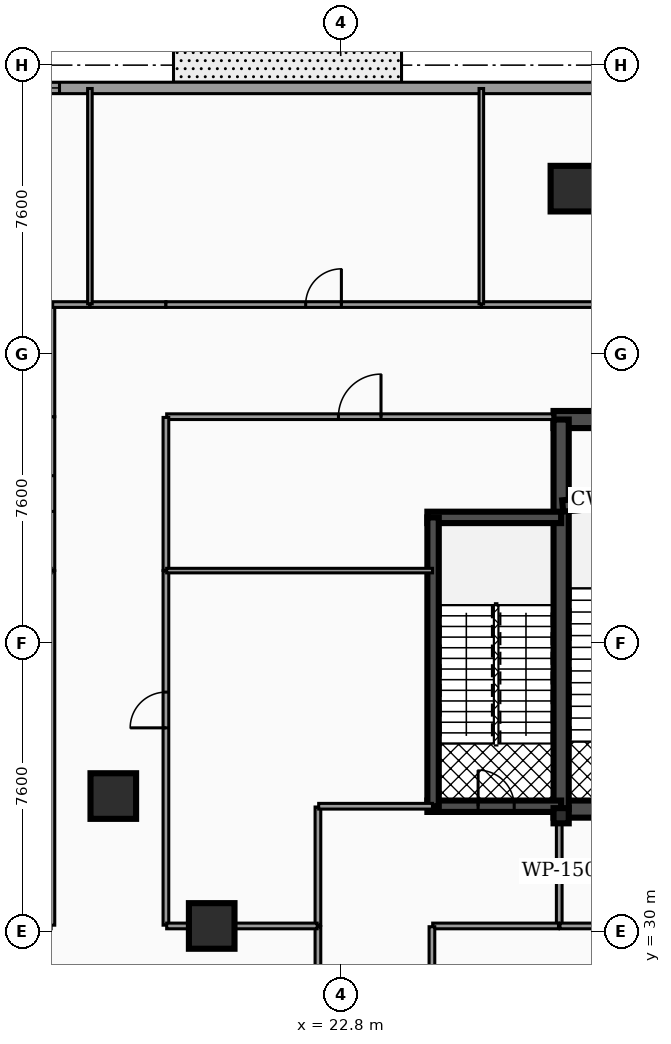
"""IFC4 building model, lengths in metres.
Left out: names, types, materials, properties, quantities, classifications, styles, units other than length and angle.
Written with IfcOpenShell. Run it as: python <this file> out.ifc"""

import sys

from ifc_helpers import new_model, si_unit, direction, frame, frame_2d, origin, origin_2d, place, context, subcontext, project, spatial, rectangle, hollow_rectangle, extrude, element, fill, save


model = new_model("IFC4")
c1 = context("Model", 3, precision=1e-05, world=origin(), true_north=direction((0.0, 1.0)))
c2 = subcontext(c1, "Body", "Model", "MODEL_VIEW")
j1 = project(units=[si_unit("LENGTHUNIT", "METRE"), si_unit("PLANEANGLEUNIT", "RADIAN")], contexts=[c1])
p1 = place(None, origin())
s1 = spatial("IfcSite", under=j1, at=p1, CompositionType="ELEMENT")
p2 = place(p1, origin())
s2 = spatial("IfcBuilding", under=s1, at=p2, CompositionType="ELEMENT")
p3 = place(p2, origin())
s3 = spatial("IfcBuildingStorey", under=s2, at=p3, CompositionType="ELEMENT", Elevation=0.0)
p4 = place(p3, frame((28.4, 43.475, 0.0), z_axis=(0.0, 0.0, 1.0), x_axis=(1.0, 0.0, 0.0)))
e1 = element("IfcWall", 1, at=p4, inside=s3, PredefinedType="SHEAR", context=c2, shape_type="SweptSolid", body=[
    extrude(rectangle(XDim=20.11, YDim=0.45, at=frame_2d((10.055, 0.0))), origin(), (0.0, 0.0, 1.0), 4.82),
])
p5 = place(p3, frame((28.4, 33.225, 0.0), z_axis=(0.0, 0.0, 1.0), x_axis=(1.0, 0.0, 0.0)))
e2 = element("IfcWall", 2, at=p5, inside=s3, PredefinedType="SHEAR", context=c2, shape_type="SweptSolid", body=[
    extrude(rectangle(XDim=20.11, YDim=0.45, at=frame_2d((10.055, 0.0))), origin(), (0.0, 0.0, 1.0), 4.82),
])
p6 = place(p5, frame((4.03, 0.0, 0.0)))
e3 = element("IfcOpeningElement", 3, at=p6, cuts=e2, PredefinedType="OPENING", context=c2, shape_type="SweptSolid", body=[
    extrude(rectangle(XDim=1.1, YDim=2.15, at=frame_2d((0.55, 1.075))), frame((0.0, 0.235, 0.0), z_axis=(0.0, -1.0, 0.0), x_axis=(1.0, 0.0, 0.0)), (0.0, 0.0, 1.0), 0.47),
])
p7 = place(p5, frame((14.87, 0.0, 0.0)))
e4 = element("IfcOpeningElement", 4, at=p7, cuts=e2, PredefinedType="OPENING", context=c2, shape_type="SweptSolid", body=[
    extrude(rectangle(XDim=1.1, YDim=2.15, at=frame_2d((0.55, 1.075))), frame((0.0, 0.235, 0.0), z_axis=(0.0, -1.0, 0.0), x_axis=(1.0, 0.0, 0.0)), (0.0, 0.0, 1.0), 0.47),
])
p8 = place(p5, frame((5.95, 0.0, 0.0)))
e5 = element("IfcOpeningElement", 5, at=p8, cuts=e2, PredefinedType="OPENING", context=c2, shape_type="SweptSolid", body=[
    extrude(rectangle(XDim=1.0, YDim=2.1, at=frame_2d((0.5, 1.05))), frame((0.0, 0.235, 0.0), z_axis=(0.0, -1.0, 0.0), x_axis=(1.0, 0.0, 0.0)), (0.0, 0.0, 1.0), 0.47),
])
p9 = place(p5, frame((7.65, 0.0, 0.0)))
e6 = element("IfcOpeningElement", 6, at=p9, cuts=e2, PredefinedType="OPENING", context=c2, shape_type="SweptSolid", body=[
    extrude(rectangle(XDim=1.0, YDim=2.1, at=frame_2d((0.5, 1.05))), frame((0.0, 0.235, 0.0), z_axis=(0.0, -1.0, 0.0), x_axis=(1.0, 0.0, 0.0)), (0.0, 0.0, 1.0), 0.47),
])
p10 = place(p5, frame((11.35, 0.0, 0.0)))
e7 = element("IfcOpeningElement", 7, at=p10, cuts=e2, PredefinedType="OPENING", context=c2, shape_type="SweptSolid", body=[
    extrude(rectangle(XDim=1.0, YDim=2.1, at=frame_2d((0.5, 1.05))), frame((0.0, 0.235, 0.0), z_axis=(0.0, -1.0, 0.0), x_axis=(1.0, 0.0, 0.0)), (0.0, 0.0, 1.0), 0.47),
])
p11 = place(p5, frame((13.05, 0.0, 0.0)))
e8 = element("IfcOpeningElement", 8, at=p11, cuts=e2, PredefinedType="OPENING", context=c2, shape_type="SweptSolid", body=[
    extrude(rectangle(XDim=1.0, YDim=2.1, at=frame_2d((0.5, 1.05))), frame((0.0, 0.235, 0.0), z_axis=(0.0, -1.0, 0.0), x_axis=(1.0, 0.0, 0.0)), (0.0, 0.0, 1.0), 0.47),
])
p12 = place(p5, frame((1.31, 0.0, 0.0)))
e9 = element("IfcOpeningElement", 9, at=p12, cuts=e2, PredefinedType="OPENING", context=c2, shape_type="SweptSolid", body=[
    extrude(rectangle(XDim=1.1, YDim=2.2, at=frame_2d((0.55, 1.1))), frame((0.0, 0.235, 0.0), z_axis=(0.0, -1.0, 0.0), x_axis=(1.0, 0.0, 0.0)), (0.0, 0.0, 1.0), 0.47),
])
p13 = place(p5, frame((9.44, 0.0, 0.0)))
e10 = element("IfcOpeningElement", 10, at=p13, cuts=e2, PredefinedType="OPENING", context=c2, shape_type="SweptSolid", body=[
    extrude(rectangle(XDim=1.12, YDim=2.05, at=frame_2d((0.56, 1.025))), frame((0.0, 0.235, 0.0), z_axis=(0.0, -1.0, 0.0), x_axis=(1.0, 0.0, 0.0)), (0.0, 0.0, 1.0), 0.47),
])
p14 = place(p5, frame((17.65, 0.0, 0.0)))
e11 = element("IfcOpeningElement", 11, at=p14, cuts=e2, PredefinedType="OPENING", context=c2, shape_type="SweptSolid", body=[
    extrude(rectangle(XDim=1.1, YDim=2.2, at=frame_2d((0.55, 1.1))), frame((0.0, 0.235, 0.0), z_axis=(0.0, -1.0, 0.0), x_axis=(1.0, 0.0, 0.0)), (0.0, 0.0, 1.0), 0.47),
])
p15 = place(p3, frame((28.6, 33.225, 0.0), z_axis=(0.0, 0.0, 1.0), x_axis=(0.0, 1.0, 0.0)))
e12 = element("IfcWall", 12, at=p15, inside=s3, PredefinedType="SHEAR", context=c2, shape_type="SweptSolid", body=[
    extrude(rectangle(XDim=10.25, YDim=0.4, at=frame_2d((5.125, 0.0))), origin(), (0.0, 0.0, 1.0), 4.82),
])
p16 = place(p3, frame((28.64, 41.2, 0.0), z_axis=(0.0, 0.0, 1.0), x_axis=(0.995687118776, 0.092774789157, 0.0)))
e13 = element("IfcWall", 13, at=p16, inside=s3, PredefinedType="SHEAR", context=c2, shape_type="SweptSolid", body=[
    extrude(rectangle(XDim=3.234, YDim=0.3, at=frame_2d((1.617, 0.0))), origin(), (0.0, 0.0, 1.0), 4.82),
])
p17 = place(p3, frame((25.08, 40.9, 0.0), z_axis=(0.0, 0.0, 1.0), x_axis=(1.0, 0.0, 0.0)))
e14 = element("IfcWall", 14, at=p17, inside=s3, PredefinedType="SHEAR", context=c2, shape_type="SweptSolid", body=[
    extrude(rectangle(XDim=3.52, YDim=0.3, at=frame_2d((1.76, 0.0))), origin(), (0.0, 0.0, 1.0), 4.82),
])
p18 = place(p3, frame((25.08, 33.3, 0.0), z_axis=(0.0, 0.0, 1.0), x_axis=(1.0, 0.0, 0.0)))
e15 = element("IfcWall", 15, at=p18, inside=s3, PredefinedType="SHEAR", context=c2, shape_type="SweptSolid", body=[
    extrude(rectangle(XDim=3.52, YDim=0.3, at=frame_2d((1.76, 0.0))), origin(), (0.0, 0.0, 1.0), 4.82),
])
p19 = place(p18, frame((1.335, 0.0, 0.0)))
e16 = element("IfcOpeningElement", 16, at=p19, cuts=e15, PredefinedType="OPENING", context=c2, shape_type="SweptSolid", body=[
    extrude(rectangle(XDim=0.95, YDim=2.2, at=frame_2d((0.475, 1.1))), frame((0.0, 0.16, 0.0), z_axis=(0.0, -1.0, 0.0), x_axis=(1.0, 0.0, 0.0)), (0.0, 0.0, 1.0), 0.32),
])
p20 = place(p3, frame((25.23, 33.3, 0.0), z_axis=(0.0, 0.0, 1.0), x_axis=(0.0, 1.0, 0.0)))
e17 = element("IfcWall", 17, at=p20, inside=s3, PredefinedType="SHEAR", context=c2, shape_type="SweptSolid", body=[
    extrude(rectangle(XDim=7.6, YDim=0.3, at=frame_2d((3.8, 0.0))), origin(), (0.0, 0.0, 1.0), 4.82),
])
for number, where, z_axis, x_axis in (
    (18, (28.923, 49.55, 0.0), (0.0, 0.0, 1.0), (1.0, 0.0, 0.0)),
    (19, (16.815, 33.568, 0.0), (0.0, 0.0, 1.0), (1.0, 0.0, 0.0)),
    (20, (19.405, 30.15, 0.0), (0.0, 0.0, 1.0), (1.0, 0.0, 0.0)),
):
    element("IfcColumn", number, at=place(p3, frame(where, z_axis=z_axis, x_axis=x_axis)), inside=s3, PredefinedType="COLUMN", context=c2, shape_type="SweptSolid", body=[
        extrude(hollow_rectangle(XDim=1.2, YDim=1.2, WallThickness=0.06, at=origin_2d()), origin(), (0.0, 0.0, 1.0), 4.82),
    ])
p21 = place(p3, frame((28.6, 33.05, 0.0), z_axis=(0.0, 0.0, 1.0), x_axis=(1.0, 0.0, 0.0)))
e21 = element("IfcColumn", 21, at=p21, inside=s3, PredefinedType="PILASTER", context=c2, shape_type="SweptSolid", body=[
    extrude(hollow_rectangle(XDim=0.4, YDim=0.4, WallThickness=0.02, at=origin_2d()), origin(), (0.0, 0.0, 1.0), 4.82),
])
p22 = place(p3, frame((1.7, 52.2, 0.0), z_axis=(0.0, 0.0, 1.0), x_axis=(1.0, 0.0, 0.0)))
e22 = element("IfcWall", 22, at=p22, inside=s3, PredefinedType="STANDARD", context=c2, shape_type="SweptSolid", body=[
    extrude(rectangle(XDim=73.4, YDim=0.3, at=frame_2d((36.7, 0.0))), origin(), (0.0, 0.0, 1.0), 4.205),
])
p23 = place(p22, frame((7.3, 0.0, 0.0)))
e23 = element("IfcOpeningElement", 23, at=p23, cuts=e22, PredefinedType="OPENING", context=c2, shape_type="SweptSolid", body=[
    extrude(rectangle(XDim=4.0, YDim=3.5, at=frame_2d((2.0, 1.75))), frame((0.0, 0.16, 0.0), z_axis=(0.0, -1.0, 0.0), x_axis=(1.0, 0.0, 0.0)), (0.0, 0.0, 1.0), 0.32),
])
p24 = place(p22, frame((31.45, 0.0, 0.0)))
e24 = element("IfcOpeningElement", 24, at=p24, cuts=e22, PredefinedType="OPENING", context=c2, shape_type="SweptSolid", body=[
    extrude(rectangle(XDim=2.4, YDim=2.6, at=frame_2d((1.2, 1.3))), frame((0.0, 0.16, 0.0), z_axis=(0.0, -1.0, 0.0), x_axis=(1.0, 0.0, 0.0)), (0.0, 0.0, 1.0), 0.32),
])
p25 = place(p22, frame((44.2, 0.0, 1.0)))
e25 = element("IfcOpeningElement", 25, at=p25, cuts=e22, PredefinedType="OPENING", context=c2, shape_type="SweptSolid", body=[
    extrude(rectangle(XDim=1.2, YDim=1.5, at=frame_2d((0.6, 0.75))), frame((0.0, 0.16, 0.0), z_axis=(0.0, -1.0, 0.0), x_axis=(1.0, 0.0, 0.0)), (0.0, 0.0, 1.0), 0.32),
])
p26 = place(p22, frame((11.9, 0.0, 0.95)))
e26 = element("IfcOpeningElement", 26, at=p26, cuts=e22, PredefinedType="OPENING", context=c2, shape_type="SweptSolid", body=[
    extrude(rectangle(XDim=1.8, YDim=2.1, at=frame_2d((0.9, 1.05))), frame((0.0, 0.16, 0.0), z_axis=(0.0, -1.0, 0.0), x_axis=(1.0, 0.0, 0.0)), (0.0, 0.0, 1.0), 0.32),
])
p27 = place(p22, frame((59.8, 0.0, 0.95)))
e27 = element("IfcOpeningElement", 27, at=p27, cuts=e22, PredefinedType="OPENING", context=c2, shape_type="SweptSolid", body=[
    extrude(rectangle(XDim=1.8, YDim=2.1, at=frame_2d((0.9, 1.05))), frame((0.0, 0.16, 0.0), z_axis=(0.0, -1.0, 0.0), x_axis=(1.0, 0.0, 0.0)), (0.0, 0.0, 1.0), 0.32),
])
p28 = place(p22, frame((66.8, 0.0, 0.95)))
e28 = element("IfcOpeningElement", 28, at=p28, cuts=e22, PredefinedType="OPENING", context=c2, shape_type="SweptSolid", body=[
    extrude(rectangle(XDim=1.8, YDim=2.1, at=frame_2d((0.9, 1.05))), frame((0.0, 0.16, 0.0), z_axis=(0.0, -1.0, 0.0), x_axis=(1.0, 0.0, 0.0)), (0.0, 0.0, 1.0), 0.32),
])
p29 = place(p3, frame((28.55, 30.17, 0.0), z_axis=(0.0, 0.0, 1.0), x_axis=(0.0, 1.0, 0.0)))
e29 = element("IfcWall", 29, at=p29, inside=s3, PredefinedType="PARTITIONING", context=c2, shape_type="SweptSolid", body=[
    extrude(rectangle(XDim=2.862, YDim=0.15, at=frame_2d((1.431, 0.0))), origin(), (0.0, 0.0, 1.0), 3.777),
])
p30 = place(p3, frame((41.995, 30.15, 0.0), z_axis=(0.0, 0.0, 1.0), x_axis=(-1.0, 0.0, 0.0)))
e30 = element("IfcWall", 30, at=p30, inside=s3, PredefinedType="PARTITIONING", context=c2, shape_type="SweptSolid", body=[
    extrude(rectangle(XDim=13.425, YDim=0.15, at=frame_2d((6.712, 0.0))), origin(), (0.0, 0.0, 1.0), 3.777),
])
p31 = place(p30, frame((6.242, 0.0, 0.0)))
e31 = element("IfcOpeningElement", 31, at=p31, cuts=e30, PredefinedType="OPENING", context=c2, shape_type="SweptSolid", body=[
    extrude(rectangle(XDim=0.94, YDim=2.05, at=frame_2d((0.47, 1.025))), frame((0.0, 0.085, 0.0), z_axis=(0.0, -1.0, 0.0), x_axis=(1.0, 0.0, 0.0)), (0.0, 0.0, 1.0), 0.17),
])
p32 = place(p3, frame((22.2, 27.355, 0.0), z_axis=(0.0, 0.0, 1.0), x_axis=(0.0, 1.0, 0.0)))
e32 = element("IfcWall", 32, at=p32, inside=s3, PredefinedType="PARTITIONING", context=c2, shape_type="SweptSolid", body=[
    extrude(rectangle(XDim=2.775, YDim=0.15, at=frame_2d((1.387, 0.0))), origin(), (0.0, 0.0, 1.0), 3.777),
])
p33 = place(p3, frame((25.22, 30.15, 0.0), z_axis=(0.0, 0.0, 1.0), x_axis=(1.0, 0.0, 0.0)))
e33 = element("IfcWall", 33, at=p33, inside=s3, PredefinedType="PARTITIONING", context=c2, shape_type="SweptSolid", body=[
    extrude(rectangle(XDim=3.31, YDim=0.15, at=frame_2d((1.655, 0.0))), origin(), (0.0, 0.0, 1.0), 3.777),
])
p34 = place(p3, frame((25.2, 27.335, 0.0), z_axis=(0.0, 0.0, 1.0), x_axis=(0.0, 1.0, 0.0)))
e34 = element("IfcWall", 34, at=p34, inside=s3, PredefinedType="PARTITIONING", context=c2, shape_type="SweptSolid", body=[
    extrude(rectangle(XDim=2.795, YDim=0.15, at=frame_2d((1.397, 0.0))), origin(), (0.0, 0.0, 1.0), 3.777),
])
p35 = place(p3, frame((22.2, 30.17, 0.0), z_axis=(0.0, 0.0, 1.0), x_axis=(0.0, 1.0, 0.0)))
e35 = element("IfcWall", 35, at=p35, inside=s3, PredefinedType="PARTITIONING", context=c2, shape_type="SweptSolid", body=[
    extrude(rectangle(XDim=3.11, YDim=0.15, at=frame_2d((1.555, 0.0))), origin(), (0.0, 0.0, 1.0), 3.777),
])
p36 = place(p3, frame((22.22, 33.3, 0.0), z_axis=(0.0, 0.0, 1.0), x_axis=(1.0, 0.0, 0.0)))
e36 = element("IfcWall", 36, at=p36, inside=s3, PredefinedType="PARTITIONING", context=c2, shape_type="SweptSolid", body=[
    extrude(rectangle(XDim=2.995, YDim=0.15, at=frame_2d((1.498, 0.0))), origin(), (0.0, 0.0, 1.0), 3.777),
])
p37 = place(p3, frame((18.2, 30.17, 0.0), z_axis=(0.0, 0.0, 1.0), x_axis=(0.0, 1.0, 0.0)))
e37 = element("IfcWall", 37, at=p37, inside=s3, PredefinedType="PARTITIONING", context=c2, shape_type="SweptSolid", body=[
    extrude(rectangle(XDim=9.325, YDim=0.15, at=frame_2d((4.663, 0.0))), origin(), (0.0, 0.0, 1.0), 3.777),
])
p38 = place(p37, frame((5.192, 0.0, 0.0)))
e38 = element("IfcOpeningElement", 38, at=p38, cuts=e37, PredefinedType="OPENING", context=c2, shape_type="SweptSolid", body=[
    extrude(rectangle(XDim=0.94, YDim=2.05, at=frame_2d((0.47, 1.025))), frame((0.0, 0.085, 0.0), z_axis=(0.0, -1.0, 0.0), x_axis=(1.0, 0.0, 0.0)), (0.0, 0.0, 1.0), 0.17),
])
p39 = place(p3, frame((18.22, 30.15, 0.0), z_axis=(0.0, 0.0, 1.0), x_axis=(1.0, 0.0, 0.0)))
e39 = element("IfcWall", 39, at=p39, inside=s3, PredefinedType="PARTITIONING", context=c2, shape_type="SweptSolid", body=[
    extrude(rectangle(XDim=3.96, YDim=0.15, at=frame_2d((1.98, 0.0))), origin(), (0.0, 0.0, 1.0), 3.777),
])
p40 = place(p3, frame((18.22, 43.55, 0.0), z_axis=(0.0, 0.0, 1.0), x_axis=(1.0, 0.0, 0.0)))
e40 = element("IfcWall", 40, at=p40, inside=s3, PredefinedType="PARTITIONING", context=c2, shape_type="SweptSolid", body=[
    extrude(rectangle(XDim=10.16, YDim=0.15, at=frame_2d((5.08, 0.0))), origin(), (0.0, 0.0, 1.0), 3.777),
])
p41 = place(p40, frame((4.52, 0.0, 0.0)))
e41 = element("IfcOpeningElement", 41, at=p41, cuts=e40, PredefinedType="OPENING", context=c2, shape_type="SweptSolid", body=[
    extrude(rectangle(XDim=1.12, YDim=2.05, at=frame_2d((0.56, 1.025))), frame((0.0, 0.085, 0.0), z_axis=(0.0, -1.0, 0.0), x_axis=(1.0, 0.0, 0.0)), (0.0, 0.0, 1.0), 0.17),
])
p42 = place(p3, frame((18.2, 39.505, 0.0), z_axis=(0.0, 0.0, 1.0), x_axis=(0.0, 1.0, 0.0)))
e42 = element("IfcWall", 42, at=p42, inside=s3, PredefinedType="PARTITIONING", context=c2, shape_type="SweptSolid", body=[
    extrude(rectangle(XDim=4.025, YDim=0.15, at=frame_2d((2.013, 0.0))), origin(), (0.0, 0.0, 1.0), 3.777),
])
p43 = place(p3, frame((15.2, 30.17, 0.0), z_axis=(0.0, 0.0, 1.0), x_axis=(0.0, 1.0, 0.0)))
e43 = element("IfcWall", 43, at=p43, inside=s3, PredefinedType="PARTITIONING", context=c2, shape_type="SweptSolid", body=[
    extrude(rectangle(XDim=9.325, YDim=0.15, at=frame_2d((4.663, 0.0))), origin(), (0.0, 0.0, 1.0), 3.777),
])
p44 = place(p3, frame((15.2, 39.505, 0.0), z_axis=(0.0, 0.0, 1.0), x_axis=(0.0, 1.0, 0.0)))
e44 = element("IfcWall", 44, at=p44, inside=s3, PredefinedType="PARTITIONING", context=c2, shape_type="SweptSolid", body=[
    extrude(rectangle(XDim=4.045, YDim=0.15, at=frame_2d((2.022, 0.0))), origin(), (0.0, 0.0, 1.0), 3.777),
])
p45 = place(p44, frame((1.552, 0.0, 0.0)))
e45 = element("IfcOpeningElement", 45, at=p45, cuts=e44, PredefinedType="OPENING", context=c2, shape_type="SweptSolid", body=[
    extrude(rectangle(XDim=0.94, YDim=2.05, at=frame_2d((0.47, 1.025))), frame((0.0, 0.085, 0.0), z_axis=(0.0, -1.0, 0.0), x_axis=(1.0, 0.0, 0.0)), (0.0, 0.0, 1.0), 0.17),
])
p46 = place(p3, frame((15.2, 43.55, 0.0), z_axis=(0.0, 0.0, 1.0), x_axis=(0.0, 1.0, 0.0)))
e46 = element("IfcWall", 46, at=p46, inside=s3, PredefinedType="PARTITIONING", context=c2, shape_type="SweptSolid", body=[
    extrude(rectangle(XDim=2.93, YDim=0.15, at=frame_2d((1.465, 0.0))), origin(), (0.0, 0.0, 1.0), 3.777),
])
p47 = place(p3, frame((15.22, 46.5, 0.0), z_axis=(0.0, 0.0, 1.0), x_axis=(1.0, 0.0, 0.0)))
e47 = element("IfcWall", 47, at=p47, inside=s3, PredefinedType="PARTITIONING", context=c2, shape_type="SweptSolid", body=[
    extrude(rectangle(XDim=0.975, YDim=0.15, at=frame_2d((0.488, 0.0))), origin(), (0.0, 0.0, 1.0), 3.777),
])
p48 = place(p3, frame((16.205, 46.5, 0.0), z_axis=(0.0, 0.0, 1.0), x_axis=(1.0, 0.0, 0.0)))
e48 = element("IfcWall", 48, at=p48, inside=s3, PredefinedType="PARTITIONING", context=c2, shape_type="SweptSolid", body=[
    extrude(rectangle(XDim=1.995, YDim=0.15, at=frame_2d((0.998, 0.0))), origin(), (0.0, 0.0, 1.0), 3.777),
])
p49 = place(p3, frame((18.2, 46.5, 0.0), z_axis=(0.0, 0.0, 1.0), x_axis=(1.0, 0.0, 0.0)))
e49 = element("IfcWall", 49, at=p49, inside=s3, PredefinedType="PARTITIONING", context=c2, shape_type="SweptSolid", body=[
    extrude(rectangle(XDim=8.295, YDim=0.15, at=frame_2d((4.147, 0.0))), origin(), (0.0, 0.0, 1.0), 3.777),
])
p50 = place(p49, frame((3.677, 0.0, 0.0)))
e50 = element("IfcOpeningElement", 50, at=p50, cuts=e49, PredefinedType="OPENING", context=c2, shape_type="SweptSolid", body=[
    extrude(rectangle(XDim=0.94, YDim=2.05, at=frame_2d((0.47, 1.025))), frame((0.0, 0.085, 0.0), z_axis=(0.0, -1.0, 0.0), x_axis=(1.0, 0.0, 0.0)), (0.0, 0.0, 1.0), 0.17),
])
p51 = place(p3, frame((26.505, 46.5, 0.0), z_axis=(0.0, 0.0, 1.0), x_axis=(1.0, 0.0, 0.0)))
e51 = element("IfcWall", 51, at=p51, inside=s3, PredefinedType="PARTITIONING", context=c2, shape_type="SweptSolid", body=[
    extrude(rectangle(XDim=10.075, YDim=0.15, at=frame_2d((5.038, 0.0))), origin(), (0.0, 0.0, 1.0), 3.777),
])
p52 = place(p51, frame((4.567, 0.0, 0.0)))
e52 = element("IfcOpeningElement", 52, at=p52, cuts=e51, PredefinedType="OPENING", context=c2, shape_type="SweptSolid", body=[
    extrude(rectangle(XDim=0.94, YDim=2.05, at=frame_2d((0.47, 1.025))), frame((0.0, 0.085, 0.0), z_axis=(0.0, -1.0, 0.0), x_axis=(1.0, 0.0, 0.0)), (0.0, 0.0, 1.0), 0.17),
])
p53 = place(p3, frame((18.22, 39.5, 0.0), z_axis=(0.0, 0.0, 1.0), x_axis=(1.0, 0.0, 0.0)))
e53 = element("IfcWall", 53, at=p53, inside=s3, PredefinedType="PARTITIONING", context=c2, shape_type="SweptSolid", body=[
    extrude(rectangle(XDim=6.995, YDim=0.12, at=frame_2d((3.498, 0.0))), origin(), (0.0, 0.0, 1.0), 3.777),
])
for number, where, z_axis, x_axis in (
    (54, (16.2, 46.52, 0.0), (0.0, 0.0, 1.0), (0.0, 1.0, 0.0)),
    (55, (26.5, 46.52, 0.0), (0.0, 0.0, 1.0), (0.0, 1.0, 0.0)),
):
    element("IfcWall", number, at=place(p3, frame(where, z_axis=z_axis, x_axis=x_axis)), inside=s3, PredefinedType="PARTITIONING", context=c2, shape_type="SweptSolid", body=[
        extrude(rectangle(XDim=5.665, YDim=0.12, at=frame_2d((2.833, 0.0))), origin(), (0.0, 0.0, 1.0), 3.777),
    ])
p54 = place(p26, origin())
e56 = element("IfcWindow", 56, at=p54, inside=s3, PartitioningType="SINGLE_PANEL", PredefinedType="WINDOW", context=c2, shape_type="SweptSolid", body=[
    extrude(rectangle(XDim=1.8, YDim=2.1, at=frame_2d((0.9, 1.05))), frame((0.0, 0.03, 0.0), z_axis=(0.0, -1.0, 0.0), x_axis=(1.0, 0.0, 0.0)), (0.0, 0.0, 1.0), 0.06),
])
fill(e26, e56)
p55 = place(p19, origin())
e57 = element("IfcDoor", 57, at=p55, inside=s3, OperationType="SINGLE_SWING_LEFT", PredefinedType="DOOR", context=c2, shape_type="SweptSolid", body=[
    extrude(rectangle(XDim=0.95, YDim=2.2, at=frame_2d((0.475, 1.1))), frame((0.0, 0.025, 0.0), z_axis=(0.0, -1.0, 0.0), x_axis=(1.0, 0.0, 0.0)), (0.0, 0.0, 1.0), 0.05),
])
fill(e16, e57)
p56 = place(p38, origin())
e58 = element("IfcDoor", 58, at=p56, inside=s3, OperationType="SINGLE_SWING_LEFT", PredefinedType="DOOR", context=c2, shape_type="SweptSolid", body=[
    extrude(rectangle(XDim=0.94, YDim=2.05, at=frame_2d((0.47, 1.025))), frame((0.0, 0.025, 0.0), z_axis=(0.0, -1.0, 0.0), x_axis=(1.0, 0.0, 0.0)), (0.0, 0.0, 1.0), 0.05),
])
fill(e38, e58)
p57 = place(p41, origin())
e59 = element("IfcDoor", 59, at=p57, inside=s3, OperationType="SINGLE_SWING_RIGHT", PredefinedType="DOOR", context=c2, shape_type="SweptSolid", body=[
    extrude(rectangle(XDim=1.12, YDim=2.05, at=frame_2d((0.56, 1.025))), frame((0.0, 0.025, 0.0), z_axis=(0.0, -1.0, 0.0), x_axis=(1.0, 0.0, 0.0)), (0.0, 0.0, 1.0), 0.05),
])
fill(e41, e59)
p58 = place(p45, origin())
e60 = element("IfcDoor", 60, at=p58, inside=s3, OperationType="SINGLE_SWING_LEFT", PredefinedType="DOOR", context=c2, shape_type="SweptSolid", body=[
    extrude(rectangle(XDim=0.94, YDim=2.05, at=frame_2d((0.47, 1.025))), frame((0.0, 0.025, 0.0), z_axis=(0.0, -1.0, 0.0), x_axis=(1.0, 0.0, 0.0)), (0.0, 0.0, 1.0), 0.05),
])
fill(e45, e60)
p59 = place(p50, origin())
e61 = element("IfcDoor", 61, at=p59, inside=s3, OperationType="SINGLE_SWING_RIGHT", PredefinedType="DOOR", context=c2, shape_type="SweptSolid", body=[
    extrude(rectangle(XDim=0.94, YDim=2.05, at=frame_2d((0.47, 1.025))), frame((0.0, 0.025, 0.0), z_axis=(0.0, -1.0, 0.0), x_axis=(1.0, 0.0, 0.0)), (0.0, 0.0, 1.0), 0.05),
])
fill(e50, e61)
save(model, sys.argv[1])
